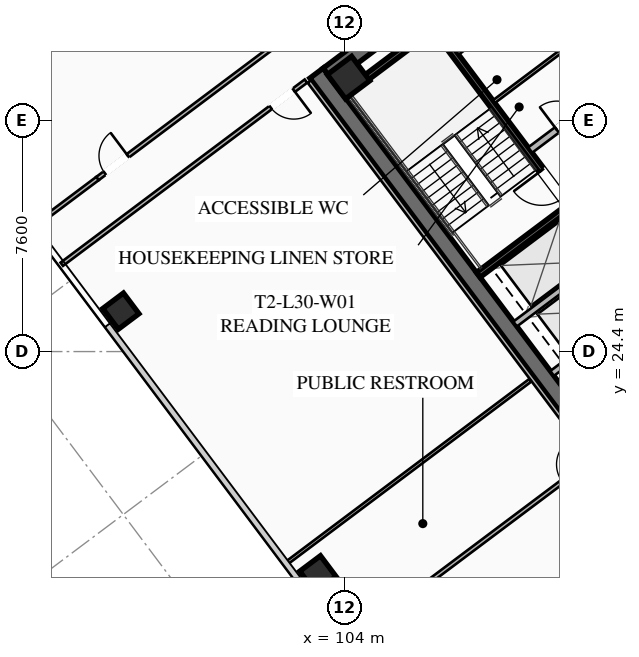
"""IFC4 building model, lengths in metres.
Left out: names, types, materials, properties, quantities, classifications, styles, units other than length and angle.
Written with IfcOpenShell. Run it as: python <this file> out.ifc"""

import sys

from ifc_helpers import new_model, si_unit, direction, frame, frame_2d, origin, origin_2d, place, context, subcontext, project, spatial, rectangle, hollow_rectangle, extrude, element, fill, save


model = new_model("IFC4")
c1 = context("Model", 3, precision=1e-05, world=origin(), true_north=direction((0.0, 1.0)))
c2 = subcontext(c1, "Body", "Model", "MODEL_VIEW")
j1 = project(units=[si_unit("LENGTHUNIT", "METRE"), si_unit("PLANEANGLEUNIT", "RADIAN")], contexts=[c1])
p1 = place(None, origin())
s1 = spatial("IfcSite", under=j1, at=p1, CompositionType="ELEMENT")
p2 = place(p1, origin())
s2 = spatial("IfcBuilding", under=s1, at=p2, CompositionType="ELEMENT")
p3 = place(p2, frame((0.0, 0.0, 114.4)))
s3 = spatial("IfcBuildingStorey", under=s2, at=p3, CompositionType="ELEMENT", Elevation=114.4)
p4 = place(p3, frame((112.436, 21.077, 0.0), z_axis=(0.0, 0.0, 1.0), x_axis=(-0.600005007985, 0.799996243986, 0.0)))
e1 = element("IfcWall", 1, at=p4, inside=s3, PredefinedType="SHEAR", context=c2, shape_type="SweptSolid", body=[
    extrude(rectangle(XDim=15.6, YDim=0.55, at=frame_2d((7.8, 0.0))), origin(), (0.0, 0.0, 1.0), 3.55),
])
p5 = place(p3, frame((103.461, 33.502, 0.0), z_axis=(0.0, 0.0, 1.0), x_axis=(0.799998054672, 0.600002593761, 0.0)))
e2 = element("IfcWall", 2, at=p5, inside=s3, PredefinedType="SHEAR", context=c2, shape_type="SweptSolid", body=[
    extrude(rectangle(XDim=15.06, YDim=0.55, at=frame_2d((7.53, 0.0))), origin(), (0.0, 0.0, 1.0), 3.55),
])
p6 = place(p5, frame((4.58, 0.0, 0.0)))
e3 = element("IfcOpeningElement", 3, at=p6, cuts=e2, PredefinedType="OPENING", context=c2, shape_type="SweptSolid", body=[
    extrude(rectangle(XDim=1.25, YDim=2.25, at=frame_2d((0.625, 1.125))), frame((0.0, 0.285, 0.0), z_axis=(0.0, -1.0, 0.0), x_axis=(1.0, 0.0, 0.0)), (0.0, 0.0, 1.0), 0.57),
])
p7 = place(p5, frame((9.63, 0.0, 0.0)))
e4 = element("IfcOpeningElement", 4, at=p7, cuts=e2, PredefinedType="OPENING", context=c2, shape_type="SweptSolid", body=[
    extrude(rectangle(XDim=1.25, YDim=2.25, at=frame_2d((0.625, 1.125))), frame((0.0, 0.285, 0.0), z_axis=(0.0, -1.0, 0.0), x_axis=(1.0, 0.0, 0.0)), (0.0, 0.0, 1.0), 0.57),
])
p8 = place(p3, frame((104.13, 33.41, 0.0), z_axis=(0.0, 0.0, 1.0), x_axis=(0.799999996291, 0.600000004945, 0.0)))
e5 = element("IfcColumn", 5, at=p8, inside=s3, PredefinedType="COLUMN", context=c2, shape_type="SweptSolid", body=[
    extrude(hollow_rectangle(XDim=1.0, YDim=1.0, WallThickness=0.04, at=origin_2d()), origin(), (0.0, 0.0, 1.0), 3.37),
])
for number, where, z_axis, x_axis in (
    (6, (96.64, 25.73, 0.0), (0.0, 0.0, 1.0), (0.8, 0.6, 0.0)),
    (7, (103.12, 17.09, 0.0), (0.0, 0.0, 1.0), (0.8, 0.6, 0.0)),
):
    element("IfcColumn", number, at=place(p3, frame(where, z_axis=z_axis, x_axis=x_axis)), inside=s3, PredefinedType="COLUMN", context=c2, shape_type="SweptSolid", body=[
        extrude(hollow_rectangle(XDim=0.85, YDim=0.85, WallThickness=0.035, at=origin_2d()), origin(), (0.0, 0.0, 1.0), 3.37),
    ])
p9 = place(p3, frame((111.44, 29.08, 0.0), z_axis=(0.0, 0.0, 1.0), x_axis=(-0.59999029481, 0.8000072788, 0.0)))
e8 = element("IfcWall", 8, at=p9, inside=s3, PredefinedType="SHEAR", context=c2, shape_type="SweptSolid", body=[
    extrude(rectangle(XDim=8.05, YDim=0.2, at=frame_2d((4.025, 0.0))), origin(), (0.0, 0.0, 1.0), 3.37),
])
p10 = place(p9, frame((0.45, 0.0, 0.0)))
e9 = element("IfcOpeningElement", 9, at=p10, cuts=e8, PredefinedType="OPENING", context=c2, shape_type="SweptSolid", body=[
    extrude(rectangle(XDim=1.15, YDim=2.2, at=frame_2d((0.575, 1.1))), frame((0.0, 0.11, 0.0), z_axis=(0.0, -1.0, 0.0), x_axis=(1.0, 0.0, 0.0)), (0.0, 0.0, 1.0), 0.22),
])
for number, where, z_axis, x_axis in (
    (10, (108.396, 26.922, 0.0), (0.0, 0.0, 1.0), (0.8, 0.6, 0.0)),
    (11, (103.956, 32.842, 0.0), (0.0, 0.0, 1.0), (0.8, 0.6, 0.0)),
):
    element("IfcWall", number, at=place(p3, frame(where, z_axis=z_axis, x_axis=x_axis)), inside=s3, PredefinedType="SHEAR", context=c2, shape_type="SweptSolid", body=[
        extrude(rectangle(XDim=3.83, YDim=0.2, at=frame_2d((1.915, 0.0))), origin(), (0.0, 0.0, 1.0), 3.37),
    ])
p11 = place(p3, frame((117.998, 25.936, 0.0), z_axis=(0.0, 0.0, 1.0), x_axis=(-0.600002693989, 0.799997979501, 0.0)))
e12 = element("IfcWall", 12, at=p11, inside=s3, PredefinedType="SHEAR", context=c2, shape_type="SweptSolid", body=[
    extrude(rectangle(XDim=14.5, YDim=0.2, at=frame_2d((7.25, 0.0))), origin(), (0.0, 0.0, 1.0), 3.37),
])
p12 = place(p3, frame((110.104, 31.028, 0.0), z_axis=(0.0, 0.0, 1.0), x_axis=(0.800018601094, 0.59997519774, 0.0)))
e13 = element("IfcWall", 13, at=p12, inside=s3, PredefinedType="SOLIDWALL", context=c2, shape_type="SweptSolid", body=[
    extrude(rectangle(XDim=3.15, YDim=0.22, at=frame_2d((1.575, 0.0))), origin(), (0.0, 0.0, 1.0), 2.723),
])
p13 = place(p12, frame((1.1, 0.0, 0.0)))
e14 = element("IfcOpeningElement", 14, at=p13, cuts=e13, PredefinedType="OPENING", context=c2, shape_type="SweptSolid", body=[
    extrude(rectangle(XDim=0.95, YDim=2.05, at=frame_2d((0.475, 1.025))), frame((0.0, 0.12, 0.0), z_axis=(0.0, -1.0, 0.0), x_axis=(1.0, 0.0, 0.0)), (0.0, 0.0, 1.0), 0.24),
])
for number, where, z_axis, x_axis in (
    (15, (110.826, 23.682, 0.0), (0.0, 0.0, 1.0), (0.8, 0.6, 0.0)),
    (16, (109.608, 25.306, 0.0), (0.0, 0.0, 1.0), (0.8, 0.6, 0.0)),
):
    element("IfcWall", number, at=place(p3, frame(where, z_axis=z_axis, x_axis=x_axis)), inside=s3, PredefinedType="SOLIDWALL", context=c2, shape_type="SweptSolid", body=[
        extrude(rectangle(XDim=3.48, YDim=0.2, at=frame_2d((1.74, 0.0))), origin(), (0.0, 0.0, 1.0), 3.37),
    ])
p14 = place(p3, frame((107.71, 34.22, 0.0), z_axis=(0.0, 0.0, 1.0), x_axis=(0.799981399002, 0.60002480053, 0.0)))
e17 = element("IfcWall", 17, at=p14, inside=s3, PredefinedType="PARTITIONING", context=c2, shape_type="SweptSolid", body=[
    extrude(rectangle(XDim=3.15, YDim=0.135, at=frame_2d((1.575, 0.0))), origin(), (0.0, 0.0, 1.0), 2.723),
])
p15 = place(p14, frame((1.05, 0.0, 0.0)))
e18 = element("IfcOpeningElement", 18, at=p15, cuts=e17, PredefinedType="OPENING", context=c2, shape_type="SweptSolid", body=[
    extrude(rectangle(XDim=1.05, YDim=2.2, at=frame_2d((0.525, 1.1))), frame((0.0, 0.077, 0.0), z_axis=(0.0, -1.0, 0.0), x_axis=(1.0, 0.0, 0.0)), (0.0, 0.0, 1.0), 0.155),
])
p16 = place(p3, frame((108.91, 32.62, 0.0), z_axis=(0.0, 0.0, 1.0), x_axis=(0.800018601094, 0.59997519774, 0.0)))
e19 = element("IfcWall", 19, at=p16, inside=s3, PredefinedType="PARTITIONING", context=c2, shape_type="SweptSolid", body=[
    extrude(rectangle(XDim=3.15, YDim=0.11, at=frame_2d((1.575, 0.0))), origin(), (0.0, 0.0, 1.0), 2.723),
])
p17 = place(p3, frame((115.11, 33.27, 0.0), z_axis=(0.0, 0.0, 1.0), x_axis=(-0.600011322243, 0.799991508192, 0.0)))
e20 = element("IfcWall", 20, at=p17, inside=s3, PredefinedType="SOLIDWALL", context=c2, shape_type="SweptSolid", body=[
    extrude(rectangle(XDim=6.9, YDim=0.2, at=frame_2d((3.45, 0.0))), origin(), (0.0, 0.0, 1.0), 3.37),
])
p18 = place(p17, frame((0.575, 0.0, 0.0)))
e21 = element("IfcOpeningElement", 21, at=p18, cuts=e20, PredefinedType="OPENING", context=c2, shape_type="SweptSolid", body=[
    extrude(rectangle(XDim=1.1, YDim=2.2, at=frame_2d((0.55, 1.1))), frame((0.0, 0.11, 0.0), z_axis=(0.0, -1.0, 0.0), x_axis=(1.0, 0.0, 0.0)), (0.0, 0.0, 1.0), 0.22),
])
p19 = place(p17, frame((2.825, 0.0, 0.0)))
e22 = element("IfcOpeningElement", 22, at=p19, cuts=e20, PredefinedType="OPENING", context=c2, shape_type="SweptSolid", body=[
    extrude(rectangle(XDim=1.1, YDim=2.2, at=frame_2d((0.55, 1.1))), frame((0.0, 0.11, 0.0), z_axis=(0.0, -1.0, 0.0), x_axis=(1.0, 0.0, 0.0)), (0.0, 0.0, 1.0), 0.22),
])
p20 = place(p17, frame((5.075, 0.0, 0.0)))
e23 = element("IfcOpeningElement", 23, at=p20, cuts=e20, PredefinedType="OPENING", context=c2, shape_type="SweptSolid", body=[
    extrude(rectangle(XDim=1.1, YDim=2.2, at=frame_2d((0.55, 1.1))), frame((0.0, 0.11, 0.0), z_axis=(0.0, -1.0, 0.0), x_axis=(1.0, 0.0, 0.0)), (0.0, 0.0, 1.0), 0.22),
])
p21 = place(p3, frame((95.87, 30.09, 0.0), z_axis=(0.0, 0.0, 1.0), x_axis=(0.799997191971, 0.600003744021, 0.0)))
e24 = element("IfcWall", 24, at=p21, inside=s3, PredefinedType="PARTITIONING", context=c2, shape_type="SweptSolid", body=[
    extrude(rectangle(XDim=31.3, YDim=0.135, at=frame_2d((15.65, 0.0))), origin(), (0.0, 0.0, 1.0), 2.723),
])
p22 = place(p21, frame((0.3, 0.0, 0.0)))
e25 = element("IfcOpeningElement", 25, at=p22, cuts=e24, PredefinedType="OPENING", context=c2, shape_type="SweptSolid", body=[
    extrude(rectangle(XDim=0.95, YDim=2.05, at=frame_2d((0.475, 1.025))), frame((0.0, 0.077, 0.0), z_axis=(0.0, -1.0, 0.0), x_axis=(1.0, 0.0, 0.0)), (0.0, 0.0, 1.0), 0.155),
])
p23 = place(p21, frame((30.05, 0.0, 0.0)))
e26 = element("IfcOpeningElement", 26, at=p23, cuts=e24, PredefinedType="OPENING", context=c2, shape_type="SweptSolid", body=[
    extrude(rectangle(XDim=0.95, YDim=2.05, at=frame_2d((0.475, 1.025))), frame((0.0, 0.077, 0.0), z_axis=(0.0, -1.0, 0.0), x_axis=(1.0, 0.0, 0.0)), (0.0, 0.0, 1.0), 0.155),
])
p24 = place(p3, frame((93.766, 28.512, 0.0), z_axis=(0.0, 0.0, 1.0), x_axis=(0.799977721118, 0.600029704027, 0.0)))
e27 = element("IfcWall", 27, at=p24, inside=s3, PredefinedType="PARTITIONING", context=c2, shape_type="SweptSolid", body=[
    extrude(rectangle(XDim=2.63, YDim=0.135, at=frame_2d((1.315, 0.0))), origin(), (0.0, 0.0, 1.0), 2.723),
])
p25 = place(p3, frame((133.282, 32.374, 0.0), z_axis=(0.0, 0.0, 1.0), x_axis=(-0.8, -0.6, 0.0)))
e28 = element("IfcWall", 28, at=p25, inside=s3, PredefinedType="PARTITIONING", context=c2, shape_type="SweptSolid", body=[
    extrude(rectangle(XDim=31.3, YDim=0.135, at=frame_2d((15.65, 0.0))), origin(), (0.0, 0.0, 1.0), 2.723),
])
p26 = place(p25, frame((29.97, 0.0, 0.0)))
e29 = element("IfcOpeningElement", 29, at=p26, cuts=e28, PredefinedType="OPENING", context=c2, shape_type="SweptSolid", body=[
    extrude(rectangle(XDim=0.95, YDim=2.05, at=frame_2d((0.475, 1.025))), frame((0.0, 0.077, 0.0), z_axis=(0.0, -1.0, 0.0), x_axis=(1.0, 0.0, 0.0)), (0.0, 0.0, 1.0), 0.155),
])
p27 = place(p25, frame((19.151, 0.0, 0.0)))
e30 = element("IfcOpeningElement", 30, at=p27, cuts=e28, PredefinedType="OPENING", context=c2, shape_type="SweptSolid", body=[
    extrude(rectangle(XDim=0.95, YDim=2.05, at=frame_2d((0.475, 1.025))), frame((0.0, 0.077, 0.0), z_axis=(0.0, -1.0, 0.0), x_axis=(1.0, 0.0, 0.0)), (0.0, 0.0, 1.0), 0.155),
])
p28 = place(p25, frame((14.901, 0.0, 0.0)))
e31 = element("IfcOpeningElement", 31, at=p28, cuts=e28, PredefinedType="OPENING", context=c2, shape_type="SweptSolid", body=[
    extrude(rectangle(XDim=0.95, YDim=2.05, at=frame_2d((0.475, 1.025))), frame((0.0, 0.077, 0.0), z_axis=(0.0, -1.0, 0.0), x_axis=(1.0, 0.0, 0.0)), (0.0, 0.0, 1.0), 0.155),
])
p29 = place(p25, frame((10.92, 0.0, 0.0)))
e32 = element("IfcOpeningElement", 32, at=p29, cuts=e28, PredefinedType="OPENING", context=c2, shape_type="SweptSolid", body=[
    extrude(rectangle(XDim=0.95, YDim=2.05, at=frame_2d((0.475, 1.025))), frame((0.0, 0.077, 0.0), z_axis=(0.0, -1.0, 0.0), x_axis=(1.0, 0.0, 0.0)), (0.0, 0.0, 1.0), 0.155),
])
p30 = place(p25, frame((0.38, 0.0, 0.0)))
e33 = element("IfcOpeningElement", 33, at=p30, cuts=e28, PredefinedType="OPENING", context=c2, shape_type="SweptSolid", body=[
    extrude(rectangle(XDim=0.95, YDim=2.05, at=frame_2d((0.475, 1.025))), frame((0.0, 0.077, 0.0), z_axis=(0.0, -1.0, 0.0), x_axis=(1.0, 0.0, 0.0)), (0.0, 0.0, 1.0), 0.155),
])
p31 = place(p3, frame((112.104, 20.928, 0.0), z_axis=(0.0, 0.0, 1.0), x_axis=(-0.599994940075, 0.800003794918, 0.0)))
e34 = element("IfcWall", 34, at=p31, inside=s3, PredefinedType="PARTITIONING", context=c2, shape_type="SweptSolid", body=[
    extrude(rectangle(XDim=15.44, YDim=0.135, at=frame_2d((7.72, 0.0))), origin(), (0.0, 0.0, 1.0), 2.723),
])
p32 = place(p3, frame((102.728, 33.296, 0.0), z_axis=(0.0, 0.0, 1.0), x_axis=(-0.800002918023, -0.599996109283, 0.0)))
e35 = element("IfcWall", 35, at=p32, inside=s3, PredefinedType="PARTITIONING", context=c2, shape_type="SweptSolid", body=[
    extrude(rectangle(XDim=10.04, YDim=0.135, at=frame_2d((5.02, 0.0))), origin(), (0.0, 0.0, 1.0), 2.723),
])
p33 = place(p32, frame((0.5, 0.0, 0.0)))
e36 = element("IfcOpeningElement", 36, at=p33, cuts=e35, PredefinedType="OPENING", context=c2, shape_type="SweptSolid", body=[
    extrude(rectangle(XDim=0.95, YDim=2.05, at=frame_2d((0.475, 1.025))), frame((0.0, 0.077, 0.0), z_axis=(0.0, -1.0, 0.0), x_axis=(1.0, 0.0, 0.0)), (0.0, 0.0, 1.0), 0.155),
])
p34 = place(p3, frame((104.056, 14.792, 0.0), z_axis=(0.0, 0.0, 1.0), x_axis=(0.800002918023, 0.599996109283, 0.0)))
e37 = element("IfcWall", 37, at=p34, inside=s3, PredefinedType="PARTITIONING", context=c2, shape_type="SweptSolid", body=[
    extrude(rectangle(XDim=10.04, YDim=0.135, at=frame_2d((5.02, 0.0))), origin(), (0.0, 0.0, 1.0), 2.723),
])
p35 = place(p34, frame((8.88, 0.0, 0.0)))
e38 = element("IfcOpeningElement", 38, at=p35, cuts=e37, PredefinedType="OPENING", context=c2, shape_type="SweptSolid", body=[
    extrude(rectangle(XDim=0.95, YDim=2.05, at=frame_2d((0.475, 1.025))), frame((0.0, 0.077, 0.0), z_axis=(0.0, -1.0, 0.0), x_axis=(1.0, 0.0, 0.0)), (0.0, 0.0, 1.0), 0.155),
])
p36 = place(p3, frame((102.076, 17.432, 0.0), z_axis=(0.0, 0.0, 1.0), x_axis=(0.799991245945, 0.600011671896, 0.0)))
e39 = element("IfcWall", 39, at=p36, inside=s3, PredefinedType="PARTITIONING", context=c2, shape_type="SweptSolid", body=[
    extrude(rectangle(XDim=10.04, YDim=0.11, at=frame_2d((5.02, 0.0))), origin(), (0.0, 0.0, 1.0), 2.723),
])
p37 = place(p10, origin())
e40 = element("IfcDoor", 40, at=p37, inside=s3, OperationType="SINGLE_SWING_RIGHT", PredefinedType="DOOR", context=c2, shape_type="SweptSolid", body=[
    extrude(rectangle(XDim=1.15, YDim=2.2, at=frame_2d((0.575, 1.1))), frame((0.0, 0.025, 0.0), z_axis=(0.0, -1.0, 0.0), x_axis=(1.0, 0.0, 0.0)), (0.0, 0.0, 1.0), 0.05),
])
fill(e9, e40)
p38 = place(p13, origin())
e41 = element("IfcDoor", 41, at=p38, inside=s3, OperationType="SINGLE_SWING_LEFT", PredefinedType="DOOR", context=c2, shape_type="SweptSolid", body=[
    extrude(rectangle(XDim=0.95, YDim=2.05, at=frame_2d((0.475, 1.025))), frame((0.0, 0.025, 0.0), z_axis=(0.0, -1.0, 0.0), x_axis=(1.0, 0.0, 0.0)), (0.0, 0.0, 1.0), 0.05),
])
fill(e14, e41)
p39 = place(p22, origin())
e42 = element("IfcDoor", 42, at=p39, inside=s3, OperationType="SINGLE_SWING_RIGHT", PredefinedType="DOOR", context=c2, shape_type="SweptSolid", body=[
    extrude(rectangle(XDim=0.95, YDim=2.05, at=frame_2d((0.475, 1.025))), frame((0.0, 0.025, 0.0), z_axis=(0.0, -1.0, 0.0), x_axis=(1.0, 0.0, 0.0)), (0.0, 0.0, 1.0), 0.05),
])
fill(e25, e42)
p40 = place(p33, origin())
e43 = element("IfcDoor", 43, at=p40, inside=s3, OperationType="SINGLE_SWING_LEFT", PredefinedType="DOOR", context=c2, shape_type="SweptSolid", body=[
    extrude(rectangle(XDim=0.95, YDim=2.05, at=frame_2d((0.475, 1.025))), frame((0.0, 0.025, 0.0), z_axis=(0.0, -1.0, 0.0), x_axis=(1.0, 0.0, 0.0)), (0.0, 0.0, 1.0), 0.05),
])
fill(e36, e43)
save(model, sys.argv[1])
